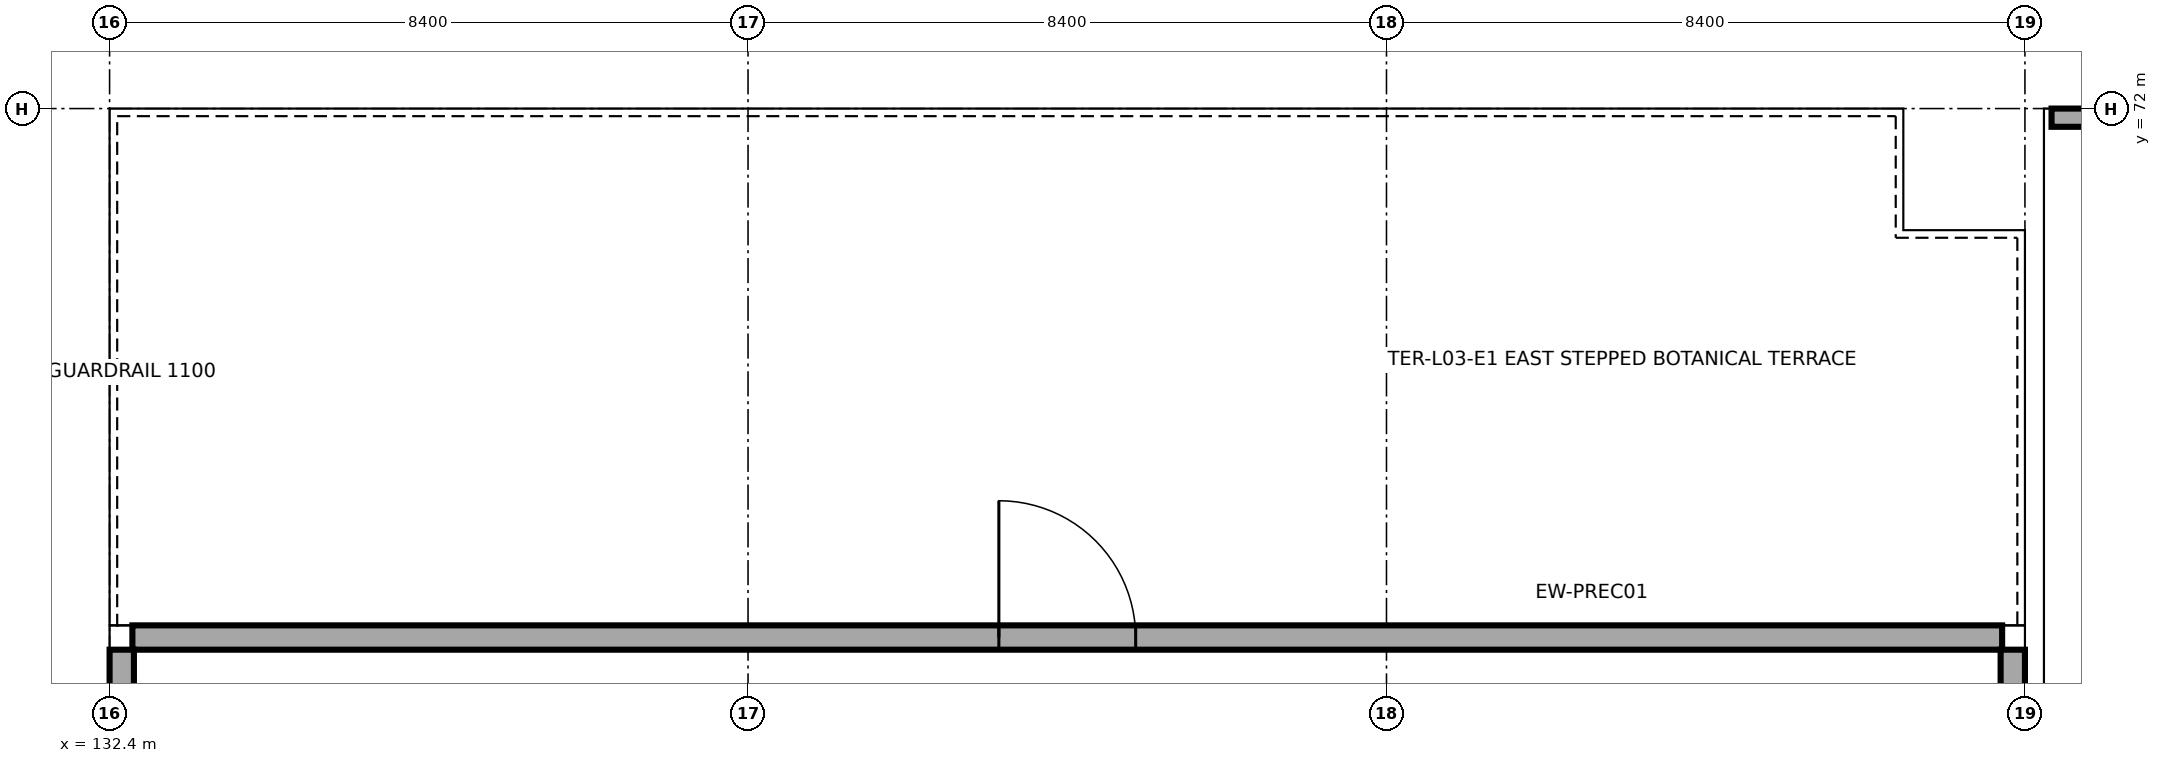
"""IFC4 building model, lengths in metres.
Left out: names, types, materials, properties, quantities, classifications, styles, units other than length and angle.
Written with IfcOpenShell. Run it as: python <this file> out.ifc"""

import sys

from ifc_helpers import new_model, si_unit, direction, frame, frame_2d, origin, place, context, subcontext, project, spatial, rectangle, extrude, element, fill, save


model = new_model("IFC4")
c1 = context("Model", 3, precision=1e-05, world=origin(), true_north=direction((0.0, 1.0)))
c2 = subcontext(c1, "Body", "Model", "MODEL_VIEW")
j1 = project(units=[si_unit("LENGTHUNIT", "METRE"), si_unit("PLANEANGLEUNIT", "RADIAN")], contexts=[c1])
p1 = place(None, origin())
s1 = spatial("IfcSite", under=j1, at=p1, CompositionType="ELEMENT")
p2 = place(p1, origin())
s2 = spatial("IfcBuilding", under=s1, at=p2, CompositionType="ELEMENT")
p3 = place(p2, frame((0.0, 0.0, 17.4)))
s3 = spatial("IfcBuildingStorey", under=s2, at=p3, CompositionType="ELEMENT", Elevation=17.4)
p4 = place(p3, frame((132.7, 65.04, 0.0), z_axis=(0.0, 0.0, 1.0), x_axis=(1.0, 0.0, 0.0)))
e1 = element("IfcWall", 1, at=p4, inside=s3, PredefinedType="SOLIDWALL", context=c2, shape_type="SweptSolid", body=[
    extrude(rectangle(XDim=24.6, YDim=0.32, at=frame_2d((12.3, 0.0))), origin(), (0.0, 0.0, 1.0), 3.88),
])
p5 = place(p4, frame((11.4, 0.0, 0.0)))
e2 = element("IfcOpeningElement", 2, at=p5, cuts=e1, PredefinedType="OPENING", context=c2, shape_type="SweptSolid", body=[
    extrude(rectangle(XDim=1.8, YDim=2.3, at=frame_2d((0.9, 1.15))), frame((0.0, 0.17, 0.0), z_axis=(0.0, -1.0, 0.0), x_axis=(1.0, 0.0, 0.0)), (0.0, 0.0, 1.0), 0.34),
])
p6 = place(p3, frame((157.95, 71.88, 0.0), z_axis=(0.0, 0.0, 1.0), x_axis=(1.0, 0.0, 0.0)))
e3 = element("IfcWall", 3, at=p6, inside=s3, PredefinedType="PARAPET", context=c2, shape_type="SweptSolid", body=[
    extrude(rectangle(XDim=6.73, YDim=0.24, at=frame_2d((3.365, 0.0))), origin(), (0.0, 0.0, 1.0), 0.95),
])
for number, where, z_axis, x_axis in (
    (4, (132.56, 60.3, 0.0), (0.0, 0.0, 1.0), (0.0, 1.0, 0.0)),
    (5, (157.44, 64.88, 0.0), (0.0, 0.0, 1.0), (0.0, -1.0, 0.0)),
):
    element("IfcWall", number, at=place(p3, frame(where, z_axis=z_axis, x_axis=x_axis)), inside=s3, PredefinedType="SOLIDWALL", context=c2, shape_type="SweptSolid", body=[
        extrude(rectangle(XDim=4.58, YDim=0.32, at=frame_2d((2.29, 0.0))), origin(), (0.0, 0.0, 1.0), 3.672),
    ])
p7 = place(p5, origin())
e6 = element("IfcDoor", 6, at=p7, inside=s3, OperationType="DOUBLE_DOOR_SINGLE_SWING", PredefinedType="DOOR", context=c2, shape_type="SweptSolid", body=[
    extrude(rectangle(XDim=1.8, YDim=2.3, at=frame_2d((0.9, 1.15))), frame((0.0, 0.025, 0.0), z_axis=(0.0, -1.0, 0.0), x_axis=(1.0, 0.0, 0.0)), (0.0, 0.0, 1.0), 0.05),
])
fill(e2, e6)
save(model, sys.argv[1])
